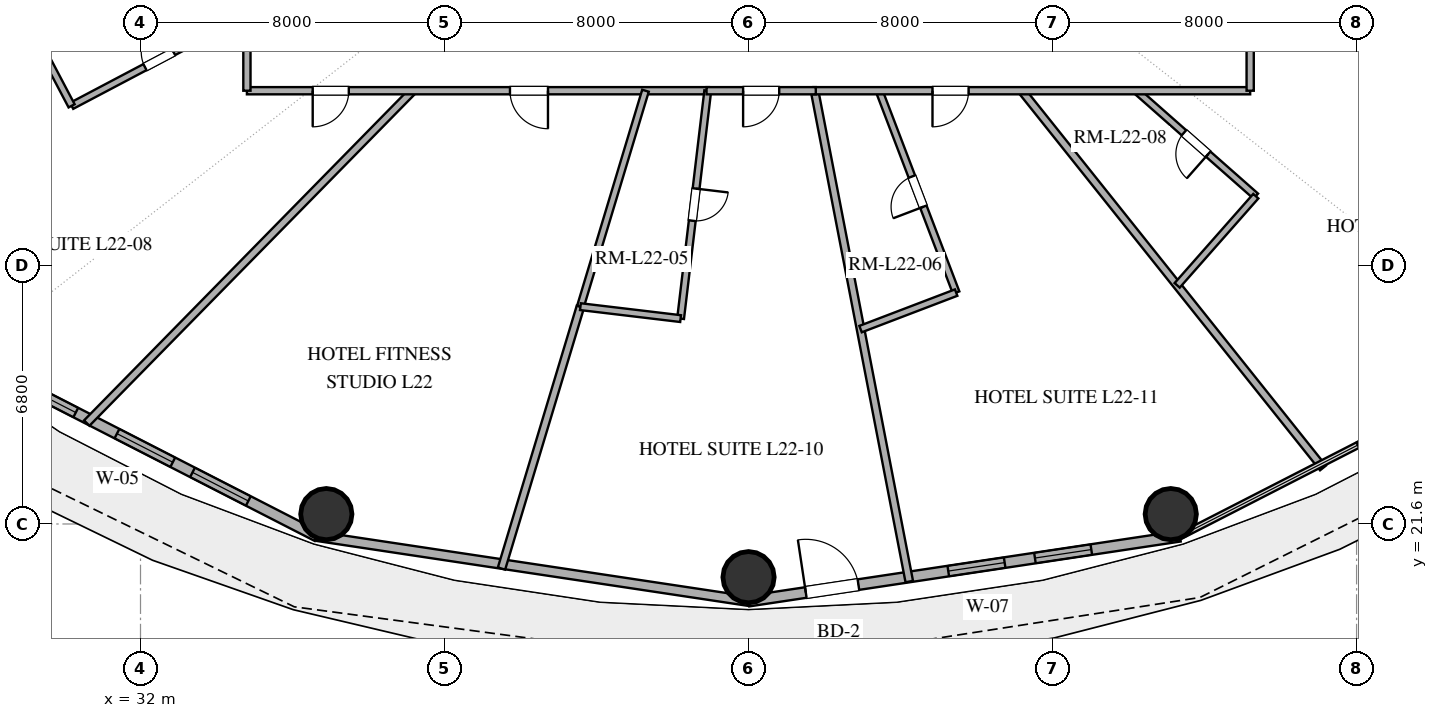
"""IFC4 building model, lengths in metres.
Left out: names, types, materials, properties, quantities, classifications, styles, units other than length and angle.
Written with IfcOpenShell. Run it as: python <this file> out.ifc"""

import sys

from ifc_helpers import new_model, si_unit, direction, frame, frame_2d, origin, origin_2d, place, context, subcontext, project, spatial, rectangle, hollow_circle, extrude, element, fill, save


model = new_model("IFC4")
c1 = context("Model", 3, precision=1e-05, world=origin(), true_north=direction((0.0, 1.0)))
c2 = subcontext(c1, "Body", "Model", "MODEL_VIEW")
j1 = project(units=[si_unit("LENGTHUNIT", "METRE"), si_unit("PLANEANGLEUNIT", "RADIAN")], contexts=[c1])
p1 = place(None, origin())
s1 = spatial("IfcSite", under=j1, at=p1, CompositionType="ELEMENT")
p2 = place(p1, origin())
s2 = spatial("IfcBuilding", under=s1, at=p2, CompositionType="ELEMENT")
p3 = place(p2, frame((0.0, 0.0, 91.2)))
s3 = spatial("IfcBuildingStorey", under=s2, at=p3, CompositionType="ELEMENT", Elevation=91.2)
for number, where, z_axis, x_axis in (
    (1, (36.89, 21.859, 0.0), (0.0, 0.0, 1.0), (1.0, 0.0, 0.0)),
    (2, (48.0, 20.2, 0.0), (0.0, 0.0, 1.0), (1.0, 0.0, 0.0)),
    (3, (59.11, 21.859, 0.0), (0.0, 0.0, 1.0), (1.0, 0.0, 0.0)),
):
    element("IfcColumn", number, at=place(p3, frame(where, z_axis=z_axis, x_axis=x_axis)), inside=s3, PredefinedType="COLUMN", context=c2, shape_type="SweptSolid", body=[
        extrude(hollow_circle(Radius=0.675, WallThickness=0.036, at=origin_2d()), origin(), (0.0, 0.0, 1.0), 3.38),
    ])
p4 = place(p3, frame((27.16, 26.14, 0.0), z_axis=(0.0, 0.0, 1.0), x_axis=(0.889959505023, -0.45603955905, 0.0)))
e4 = element("IfcWall", 4, at=p4, inside=s3, PredefinedType="SOLIDWALL", context=c2, shape_type="SweptSolid", body=[
    extrude(rectangle(XDim=10.662, YDim=0.28, at=frame_2d((5.331, 0.0))), origin(), (0.0, 0.0, 1.0), 3.38),
])
p5 = place(p4, frame((1.724, 0.0, 0.85)))
e5 = element("IfcOpeningElement", 5, at=p5, cuts=e4, PredefinedType="OPENING", context=c2, shape_type="SweptSolid", body=[
    extrude(rectangle(XDim=1.8, YDim=2.2, at=frame_2d((0.9, 1.1))), frame((0.0, 0.15, 0.0), z_axis=(0.0, -1.0, 0.0), x_axis=(1.0, 0.0, 0.0)), (0.0, 0.0, 1.0), 0.3),
])
p6 = place(p4, frame((4.742, 0.0, 0.85)))
e6 = element("IfcOpeningElement", 6, at=p6, cuts=e4, PredefinedType="OPENING", context=c2, shape_type="SweptSolid", body=[
    extrude(rectangle(XDim=1.65, YDim=2.0, at=frame_2d((0.825, 1.0))), frame((0.0, 0.15, 0.0), z_axis=(0.0, -1.0, 0.0), x_axis=(1.0, 0.0, 0.0)), (0.0, 0.0, 1.0), 0.3),
])
p7 = place(p4, frame((6.977, 0.0, 0.85)))
e7 = element("IfcOpeningElement", 7, at=p7, cuts=e4, PredefinedType="OPENING", context=c2, shape_type="SweptSolid", body=[
    extrude(rectangle(XDim=1.65, YDim=2.0, at=frame_2d((0.825, 1.0))), frame((0.0, 0.15, 0.0), z_axis=(0.0, -1.0, 0.0), x_axis=(1.0, 0.0, 0.0)), (0.0, 0.0, 1.0), 0.3),
])
p8 = place(p3, frame((36.649, 21.277, 0.0), z_axis=(0.0, 0.0, 1.0), x_axis=(0.988877774656, -0.148730450117, 0.0)))
e8 = element("IfcWall", 8, at=p8, inside=s3, PredefinedType="SOLIDWALL", context=c2, shape_type="SweptSolid", body=[
    extrude(rectangle(XDim=11.479, YDim=0.25, at=frame_2d((5.74, 0.0))), origin(), (0.0, 0.0, 1.0), 3.38),
])
p9 = place(p3, frame((48.0, 19.57, 0.0), z_axis=(0.0, 0.0, 1.0), x_axis=(0.988877774656, 0.148730450117, 0.0)))
e9 = element("IfcWall", 9, at=p9, inside=s3, PredefinedType="SOLIDWALL", context=c2, shape_type="SweptSolid", body=[
    extrude(rectangle(XDim=11.479, YDim=0.28, at=frame_2d((5.74, 0.0))), origin(), (0.0, 0.0, 1.0), 3.38),
])
p10 = place(p9, frame((1.524, 0.0, 0.0)))
e10 = element("IfcOpeningElement", 10, at=p10, cuts=e9, PredefinedType="OPENING", context=c2, shape_type="SweptSolid", body=[
    extrude(rectangle(XDim=1.4, YDim=2.2, at=frame_2d((0.7, 1.1))), frame((0.0, 0.15, 0.0), z_axis=(0.0, -1.0, 0.0), x_axis=(1.0, 0.0, 0.0)), (0.0, 0.0, 1.0), 0.3),
])
p11 = place(p9, frame((5.315, 0.0, 0.85)))
e11 = element("IfcOpeningElement", 11, at=p11, cuts=e9, PredefinedType="OPENING", context=c2, shape_type="SweptSolid", body=[
    extrude(rectangle(XDim=1.5, YDim=1.8, at=frame_2d((0.75, 0.9))), frame((0.0, 0.15, 0.0), z_axis=(0.0, -1.0, 0.0), x_axis=(1.0, 0.0, 0.0)), (0.0, 0.0, 1.0), 0.3),
])
p12 = place(p9, frame((7.621, 0.0, 0.85)))
e12 = element("IfcOpeningElement", 12, at=p12, cuts=e9, PredefinedType="OPENING", context=c2, shape_type="SweptSolid", body=[
    extrude(rectangle(XDim=1.5, YDim=1.8, at=frame_2d((0.75, 0.9))), frame((0.0, 0.15, 0.0), z_axis=(0.0, -1.0, 0.0), x_axis=(1.0, 0.0, 0.0)), (0.0, 0.0, 1.0), 0.3),
])
p13 = place(p3, frame((39.167, 33.0, 0.0), z_axis=(0.0, 0.0, 1.0), x_axis=(-0.700440086719, -0.713711205542, 0.0)))
e13 = element("IfcWall", 13, at=p13, inside=s3, PredefinedType="PARTITIONING", context=c2, shape_type="SweptSolid", body=[
    extrude(rectangle(XDim=12.252, YDim=0.2, at=frame_2d((6.126, 0.0))), origin(), (0.0, 0.0, 1.0), 2.74),
])
p14 = place(p3, frame((34.8, 37.75, 0.0), z_axis=(0.0, 0.0, 1.0), x_axis=(-0.951880556228, -0.306469258939, 0.0)))
e14 = element("IfcWall", 14, at=p14, inside=s3, PredefinedType="PARTITIONING", context=c2, shape_type="SweptSolid", body=[
    extrude(rectangle(XDim=14.428, YDim=0.2, at=frame_2d((7.214, 0.0))), origin(), (0.0, 0.0, 1.0), 2.74),
])
p15 = place(p3, frame((41.5, 20.427, 0.0), z_axis=(0.0, 0.0, 1.0), x_axis=(0.288514746458, 0.957475451944, 0.0)))
e15 = element("IfcWall", 15, at=p15, inside=s3, PredefinedType="PARTITIONING", context=c2, shape_type="SweptSolid", body=[
    extrude(rectangle(XDim=7.197, YDim=0.2, at=frame_2d((3.599, 0.0))), origin(), (0.0, 0.0, 1.0), 2.74),
])
p16 = place(p3, frame((49.737, 33.0, 0.0), z_axis=(0.0, 0.0, 1.0), x_axis=(0.18949034594, -0.981882584017, 0.0)))
e16 = element("IfcWall", 16, at=p16, inside=s3, PredefinedType="PARTITIONING", context=c2, shape_type="SweptSolid", body=[
    extrude(rectangle(XDim=13.153, YDim=0.2, at=frame_2d((6.577, 0.0))), origin(), (0.0, 0.0, 1.0), 2.74),
])
p17 = place(p3, frame((61.2, 36.208, 0.0), z_axis=(0.0, 0.0, 1.0), x_axis=(0.915722078144, -0.401812239235, 0.0)))
e17 = element("IfcWall", 17, at=p17, inside=s3, PredefinedType="PARTITIONING", context=c2, shape_type="SweptSolid", body=[
    extrude(rectangle(XDim=12.915, YDim=0.2, at=frame_2d((6.458, 0.0))), origin(), (0.0, 0.0, 1.0), 2.74),
])
p18 = place(p3, frame((55.189, 33.0, 0.0), z_axis=(0.0, 0.0, 1.0), x_axis=(0.624085468444, -0.781356082767, 0.0)))
e18 = element("IfcWall", 18, at=p18, inside=s3, PredefinedType="PARTITIONING", context=c2, shape_type="SweptSolid", body=[
    extrude(rectangle(XDim=12.703, YDim=0.2, at=frame_2d((6.352, 0.0))), origin(), (0.0, 0.0, 1.0), 2.74),
])
p19 = place(p3, frame((46.959, 33.0, 0.0), z_axis=(0.0, 0.0, 1.0), x_axis=(-1.0, 0.0, 0.0)))
e19 = element("IfcWall", 19, at=p19, inside=s3, PredefinedType="PARTITIONING", context=c2, shape_type="SweptSolid", body=[
    extrude(rectangle(XDim=12.159, YDim=0.19, at=frame_2d((6.08, 0.0))), origin(), (0.0, 0.0, 1.0), 2.74),
])
p20 = place(p19, frame((4.237, 0.0, 0.0)))
e20 = element("IfcOpeningElement", 20, at=p20, cuts=e19, PredefinedType="OPENING", context=c2, shape_type="SweptSolid", body=[
    extrude(rectangle(XDim=1.0, YDim=2.2, at=frame_2d((0.5, 1.1))), frame((0.0, 0.105, 0.0), z_axis=(0.0, -1.0, 0.0), x_axis=(1.0, 0.0, 0.0)), (0.0, 0.0, 1.0), 0.21),
])
p21 = place(p19, frame((9.478, 0.0, 0.0)))
e21 = element("IfcOpeningElement", 21, at=p21, cuts=e19, PredefinedType="OPENING", context=c2, shape_type="SweptSolid", body=[
    extrude(rectangle(XDim=0.95, YDim=2.15, at=frame_2d((0.475, 1.075))), frame((0.0, 0.105, 0.0), z_axis=(0.0, -1.0, 0.0), x_axis=(1.0, 0.0, 0.0)), (0.0, 0.0, 1.0), 0.21),
])
p22 = place(p3, frame((46.927, 33.0, 0.0), z_axis=(0.0, 0.0, 1.0), x_axis=(-0.118379942802, -0.99296837268, 0.0)))
e22 = element("IfcWall", 22, at=p22, inside=s3, PredefinedType="PLUMBINGWALL", context=c2, shape_type="SweptSolid", body=[
    extrude(rectangle(XDim=6.039, YDim=0.18, at=frame_2d((3.019, 0.0))), origin(), (0.0, 0.0, 1.0), 2.74),
])
p23 = place(p22, frame((2.594, 0.0, 0.0)))
e23 = element("IfcOpeningElement", 23, at=p23, cuts=e22, PredefinedType="OPENING", context=c2, shape_type="SweptSolid", body=[
    extrude(rectangle(XDim=0.85, YDim=2.1, at=frame_2d((0.425, 1.05))), frame((0.0, 0.1, 0.0), z_axis=(0.0, -1.0, 0.0), x_axis=(1.0, 0.0, 0.0)), (0.0, 0.0, 1.0), 0.2),
])
p24 = place(p3, frame((43.576, 27.318, 0.0), z_axis=(0.0, 0.0, 1.0), x_axis=(0.288532873685, 0.957469989505, 0.0)))
e24 = element("IfcWall", 24, at=p24, inside=s3, PredefinedType="PLUMBINGWALL", context=c2, shape_type="SweptSolid", body=[
    extrude(rectangle(XDim=5.934, YDim=0.18, at=frame_2d((2.967, 0.0))), origin(), (0.0, 0.0, 1.0), 2.74),
])
p25 = place(p3, frame((53.463, 27.688, 0.0), z_axis=(0.0, 0.0, 1.0), x_axis=(-0.356604128264, 0.934255583716, 0.0)))
e25 = element("IfcWall", 25, at=p25, inside=s3, PredefinedType="PLUMBINGWALL", context=c2, shape_type="SweptSolid", body=[
    extrude(rectangle(XDim=5.686, YDim=0.18, at=frame_2d((2.843, 0.0))), origin(), (0.0, 0.0, 1.0), 2.74),
])
p26 = place(p25, frame((2.418, 0.0, 0.0)))
e26 = element("IfcOpeningElement", 26, at=p26, cuts=e25, PredefinedType="OPENING", context=c2, shape_type="SweptSolid", body=[
    extrude(rectangle(XDim=0.85, YDim=2.1, at=frame_2d((0.425, 1.05))), frame((0.0, 0.1, 0.0), z_axis=(0.0, -1.0, 0.0), x_axis=(1.0, 0.0, 0.0)), (0.0, 0.0, 1.0), 0.2),
])
p27 = place(p3, frame((30.187, 32.602, 0.0), z_axis=(0.0, 0.0, 1.0), x_axis=(0.884469007168, 0.466598944877, 0.0)))
e27 = element("IfcWall", 27, at=p27, inside=s3, PredefinedType="PLUMBINGWALL", context=c2, shape_type="SweptSolid", body=[
    extrude(rectangle(XDim=5.216, YDim=0.18, at=frame_2d((2.608, 0.0))), origin(), (0.0, 0.0, 1.0), 2.74),
])
p28 = place(p27, frame((2.183, 0.0, 0.0)))
e28 = element("IfcOpeningElement", 28, at=p28, cuts=e27, PredefinedType="OPENING", context=c2, shape_type="SweptSolid", body=[
    extrude(rectangle(XDim=0.85, YDim=2.1, at=frame_2d((0.425, 1.05))), frame((0.0, 0.1, 0.0), z_axis=(0.0, -1.0, 0.0), x_axis=(1.0, 0.0, 0.0)), (0.0, 0.0, 1.0), 0.2),
])
p29 = place(p3, frame((34.8, 33.0, 0.0), z_axis=(0.0, 0.0, 1.0), x_axis=(0.0, 1.0, 0.0)))
e29 = element("IfcWall", 29, at=p29, inside=s3, PredefinedType="PARTITIONING", context=c2, shape_type="SweptSolid", body=[
    extrude(rectangle(XDim=9.004, YDim=0.19, at=frame_2d((4.502, 0.0))), origin(), (0.0, 0.0, 1.0), 2.74),
])
p30 = place(p29, frame((6.385, 0.0, 0.0)))
e30 = element("IfcOpeningElement", 30, at=p30, cuts=e29, PredefinedType="OPENING", context=c2, shape_type="SweptSolid", body=[
    extrude(rectangle(XDim=0.95, YDim=2.15, at=frame_2d((0.475, 1.075))), frame((0.0, 0.105, 0.0), z_axis=(0.0, -1.0, 0.0), x_axis=(1.0, 0.0, 0.0)), (0.0, 0.0, 1.0), 0.21),
])
p31 = place(p3, frame((61.348, 30.225, 0.0), z_axis=(0.0, 0.0, 1.0), x_axis=(-0.749931272561, 0.661515749197, 0.0)))
e31 = element("IfcWall", 31, at=p31, inside=s3, PredefinedType="PLUMBINGWALL", context=c2, shape_type="SweptSolid", body=[
    extrude(rectangle(XDim=4.194, YDim=0.18, at=frame_2d((2.097, 0.0))), origin(), (0.0, 0.0, 1.0), 2.74),
])
p32 = place(p31, frame((1.672, 0.0, 0.0)))
e32 = element("IfcOpeningElement", 32, at=p32, cuts=e31, PredefinedType="OPENING", context=c2, shape_type="SweptSolid", body=[
    extrude(rectangle(XDim=0.85, YDim=2.1, at=frame_2d((0.425, 1.05))), frame((0.0, 0.1, 0.0), z_axis=(0.0, -1.0, 0.0), x_axis=(1.0, 0.0, 0.0)), (0.0, 0.0, 1.0), 0.2),
])
p33 = place(p3, frame((61.2, 33.0, 0.0), z_axis=(0.0, 0.0, 1.0), x_axis=(-1.0, 0.0, 0.0)))
e33 = element("IfcWall", 33, at=p33, inside=s3, PredefinedType="PARTITIONING", context=c2, shape_type="SweptSolid", body=[
    extrude(rectangle(XDim=11.496, YDim=0.19, at=frame_2d((5.748, 0.0))), origin(), (0.0, 0.0, 1.0), 2.74),
])
p34 = place(p33, frame((7.41, 0.0, 0.0)))
e34 = element("IfcOpeningElement", 34, at=p34, cuts=e33, PredefinedType="OPENING", context=c2, shape_type="SweptSolid", body=[
    extrude(rectangle(XDim=0.95, YDim=2.15, at=frame_2d((0.475, 1.075))), frame((0.0, 0.105, 0.0), z_axis=(0.0, -1.0, 0.0), x_axis=(1.0, 0.0, 0.0)), (0.0, 0.0, 1.0), 0.21),
])
p35 = place(p3, frame((28.535, 35.733, 0.0), z_axis=(0.0, 0.0, 1.0), x_axis=(0.466638742987, -0.884448010651, 0.0)))
e35 = element("IfcWall", 35, at=p35, inside=s3, PredefinedType="PLUMBINGWALL", context=c2, shape_type="SweptSolid", body=[
    extrude(rectangle(XDim=3.54, YDim=0.18, at=frame_2d((1.77, 0.0))), origin(), (0.0, 0.0, 1.0), 2.74),
])
p36 = place(p3, frame((61.2, 36.243, 0.0), z_axis=(0.0, 0.0, 1.0), x_axis=(0.0, -1.0, 0.0)))
e36 = element("IfcWall", 36, at=p36, inside=s3, PredefinedType="PARTITIONING", context=c2, shape_type="SweptSolid", body=[
    extrude(rectangle(XDim=3.243, YDim=0.19, at=frame_2d((1.621, 0.0))), origin(), (0.0, 0.0, 1.0), 2.74),
])
p37 = place(p36, frame((1.146, 0.0, 0.0)))
e37 = element("IfcOpeningElement", 37, at=p37, cuts=e36, PredefinedType="OPENING", context=c2, shape_type="SweptSolid", body=[
    extrude(rectangle(XDim=0.95, YDim=2.15, at=frame_2d((0.475, 1.075))), frame((0.0, 0.105, 0.0), z_axis=(0.0, -1.0, 0.0), x_axis=(1.0, 0.0, 0.0)), (0.0, 0.0, 1.0), 0.21),
])
p38 = place(p3, frame((59.279, 27.879, 0.0), z_axis=(0.0, 0.0, 1.0), x_axis=(0.661515810511, 0.749931218475, 0.0)))
e38 = element("IfcWall", 38, at=p38, inside=s3, PredefinedType="PLUMBINGWALL", context=c2, shape_type="SweptSolid", body=[
    extrude(rectangle(XDim=3.129, YDim=0.18, at=frame_2d((1.564, 0.0))), origin(), (0.0, 0.0, 1.0), 2.74),
])
p39 = place(p3, frame((49.77, 33.0, 0.0), z_axis=(0.0, 0.0, 1.0), x_axis=(-1.0, 0.0, 0.0)))
e39 = element("IfcWall", 39, at=p39, inside=s3, PredefinedType="PARTITIONING", context=c2, shape_type="SweptSolid", body=[
    extrude(rectangle(XDim=2.875, YDim=0.19, at=frame_2d((1.438, 0.0))), origin(), (0.0, 0.0, 1.0), 2.74),
])
p40 = place(p39, frame((0.962, 0.0, 0.0)))
e40 = element("IfcOpeningElement", 40, at=p40, cuts=e39, PredefinedType="OPENING", context=c2, shape_type="SweptSolid", body=[
    extrude(rectangle(XDim=0.95, YDim=2.15, at=frame_2d((0.475, 1.075))), frame((0.0, 0.105, 0.0), z_axis=(0.0, -1.0, 0.0), x_axis=(1.0, 0.0, 0.0)), (0.0, 0.0, 1.0), 0.21),
])
p41 = place(p3, frame((50.948, 26.728, 0.0), z_axis=(0.0, 0.0, 1.0), x_axis=(0.934244754769, 0.35663249738, 0.0)))
e41 = element("IfcWall", 41, at=p41, inside=s3, PredefinedType="PLUMBINGWALL", context=c2, shape_type="SweptSolid", body=[
    extrude(rectangle(XDim=2.692, YDim=0.18, at=frame_2d((1.346, 0.0))), origin(), (0.0, 0.0, 1.0), 2.74),
])
p42 = place(p3, frame((46.212, 27.004, 0.0), z_axis=(0.0, 0.0, 1.0), x_axis=(-0.992959714657, 0.118452543529, 0.0)))
e42 = element("IfcWall", 42, at=p42, inside=s3, PredefinedType="PLUMBINGWALL", context=c2, shape_type="SweptSolid", body=[
    extrude(rectangle(XDim=2.655, YDim=0.18, at=frame_2d((1.327, 0.0))), origin(), (0.0, 0.0, 1.0), 2.74),
])
p43 = place(p5, origin())
e43 = element("IfcWindow", 43, at=p43, inside=s3, PartitioningType="SINGLE_PANEL", PredefinedType="WINDOW", context=c2, shape_type="SweptSolid", body=[
    extrude(rectangle(XDim=1.8, YDim=2.2, at=frame_2d((0.9, 1.1))), frame((0.0, 0.03, 0.0), z_axis=(0.0, -1.0, 0.0), x_axis=(1.0, 0.0, 0.0)), (0.0, 0.0, 1.0), 0.06),
])
fill(e5, e43)
p44 = place(p6, origin())
e44 = element("IfcWindow", 44, at=p44, inside=s3, PartitioningType="SINGLE_PANEL", PredefinedType="WINDOW", context=c2, shape_type="SweptSolid", body=[
    extrude(rectangle(XDim=1.65, YDim=2.0, at=frame_2d((0.825, 1.0))), frame((0.0, 0.03, 0.0), z_axis=(0.0, -1.0, 0.0), x_axis=(1.0, 0.0, 0.0)), (0.0, 0.0, 1.0), 0.06),
])
fill(e6, e44)
p45 = place(p7, origin())
e45 = element("IfcWindow", 45, at=p45, inside=s3, PartitioningType="SINGLE_PANEL", PredefinedType="WINDOW", context=c2, shape_type="SweptSolid", body=[
    extrude(rectangle(XDim=1.65, YDim=2.0, at=frame_2d((0.825, 1.0))), frame((0.0, 0.03, 0.0), z_axis=(0.0, -1.0, 0.0), x_axis=(1.0, 0.0, 0.0)), (0.0, 0.0, 1.0), 0.06),
])
fill(e7, e45)
p46 = place(p10, origin())
e46 = element("IfcDoor", 46, at=p46, inside=s3, OperationType="SINGLE_SWING_LEFT", PredefinedType="DOOR", context=c2, shape_type="SweptSolid", body=[
    extrude(rectangle(XDim=1.4, YDim=2.2, at=frame_2d((0.7, 1.1))), frame((0.0, 0.025, 0.0), z_axis=(0.0, -1.0, 0.0), x_axis=(1.0, 0.0, 0.0)), (0.0, 0.0, 1.0), 0.05),
])
fill(e10, e46)
p47 = place(p11, origin())
e47 = element("IfcWindow", 47, at=p47, inside=s3, PartitioningType="SINGLE_PANEL", PredefinedType="WINDOW", context=c2, shape_type="SweptSolid", body=[
    extrude(rectangle(XDim=1.5, YDim=1.8, at=frame_2d((0.75, 0.9))), frame((0.0, 0.03, 0.0), z_axis=(0.0, -1.0, 0.0), x_axis=(1.0, 0.0, 0.0)), (0.0, 0.0, 1.0), 0.06),
])
fill(e11, e47)
p48 = place(p12, origin())
e48 = element("IfcWindow", 48, at=p48, inside=s3, PartitioningType="SINGLE_PANEL", PredefinedType="WINDOW", context=c2, shape_type="SweptSolid", body=[
    extrude(rectangle(XDim=1.5, YDim=1.8, at=frame_2d((0.75, 0.9))), frame((0.0, 0.03, 0.0), z_axis=(0.0, -1.0, 0.0), x_axis=(1.0, 0.0, 0.0)), (0.0, 0.0, 1.0), 0.06),
])
fill(e12, e48)
p49 = place(p20, origin())
e49 = element("IfcDoor", 49, at=p49, inside=s3, OperationType="SINGLE_SWING_LEFT", PredefinedType="DOOR", context=c2, shape_type="SweptSolid", body=[
    extrude(rectangle(XDim=1.0, YDim=2.2, at=frame_2d((0.5, 1.1))), frame((0.0, 0.025, 0.0), z_axis=(0.0, -1.0, 0.0), x_axis=(1.0, 0.0, 0.0)), (0.0, 0.0, 1.0), 0.05),
])
fill(e20, e49)
p50 = place(p21, origin())
e50 = element("IfcDoor", 50, at=p50, inside=s3, OperationType="SINGLE_SWING_RIGHT", PredefinedType="DOOR", context=c2, shape_type="SweptSolid", body=[
    extrude(rectangle(XDim=0.95, YDim=2.15, at=frame_2d((0.475, 1.075))), frame((0.0, 0.025, 0.0), z_axis=(0.0, -1.0, 0.0), x_axis=(1.0, 0.0, 0.0)), (0.0, 0.0, 1.0), 0.05),
])
fill(e21, e50)
p51 = place(p23, origin())
e51 = element("IfcDoor", 51, at=p51, inside=s3, OperationType="SINGLE_SWING_LEFT", PredefinedType="DOOR", context=c2, shape_type="SweptSolid", body=[
    extrude(rectangle(XDim=0.85, YDim=2.1, at=frame_2d((0.425, 1.05))), frame((0.0, 0.025, 0.0), z_axis=(0.0, -1.0, 0.0), x_axis=(1.0, 0.0, 0.0)), (0.0, 0.0, 1.0), 0.05),
])
fill(e23, e51)
p52 = place(p26, origin())
e52 = element("IfcDoor", 52, at=p52, inside=s3, OperationType="SINGLE_SWING_LEFT", PredefinedType="DOOR", context=c2, shape_type="SweptSolid", body=[
    extrude(rectangle(XDim=0.85, YDim=2.1, at=frame_2d((0.425, 1.05))), frame((0.0, 0.025, 0.0), z_axis=(0.0, -1.0, 0.0), x_axis=(1.0, 0.0, 0.0)), (0.0, 0.0, 1.0), 0.05),
])
fill(e26, e52)
p53 = place(p28, origin())
e53 = element("IfcDoor", 53, at=p53, inside=s3, OperationType="SINGLE_SWING_RIGHT", PredefinedType="DOOR", context=c2, shape_type="SweptSolid", body=[
    extrude(rectangle(XDim=0.85, YDim=2.1, at=frame_2d((0.425, 1.05))), frame((0.0, 0.025, 0.0), z_axis=(0.0, -1.0, 0.0), x_axis=(1.0, 0.0, 0.0)), (0.0, 0.0, 1.0), 0.05),
])
fill(e28, e53)
p54 = place(p32, origin())
e54 = element("IfcDoor", 54, at=p54, inside=s3, OperationType="SINGLE_SWING_LEFT", PredefinedType="DOOR", context=c2, shape_type="SweptSolid", body=[
    extrude(rectangle(XDim=0.85, YDim=2.1, at=frame_2d((0.425, 1.05))), frame((0.0, 0.025, 0.0), z_axis=(0.0, -1.0, 0.0), x_axis=(1.0, 0.0, 0.0)), (0.0, 0.0, 1.0), 0.05),
])
fill(e32, e54)
p55 = place(p34, origin())
e55 = element("IfcDoor", 55, at=p55, inside=s3, OperationType="SINGLE_SWING_RIGHT", PredefinedType="DOOR", context=c2, shape_type="SweptSolid", body=[
    extrude(rectangle(XDim=0.95, YDim=2.15, at=frame_2d((0.475, 1.075))), frame((0.0, 0.025, 0.0), z_axis=(0.0, -1.0, 0.0), x_axis=(1.0, 0.0, 0.0)), (0.0, 0.0, 1.0), 0.05),
])
fill(e34, e55)
p56 = place(p40, origin())
e56 = element("IfcDoor", 56, at=p56, inside=s3, OperationType="SINGLE_SWING_RIGHT", PredefinedType="DOOR", context=c2, shape_type="SweptSolid", body=[
    extrude(rectangle(XDim=0.95, YDim=2.15, at=frame_2d((0.475, 1.075))), frame((0.0, 0.025, 0.0), z_axis=(0.0, -1.0, 0.0), x_axis=(1.0, 0.0, 0.0)), (0.0, 0.0, 1.0), 0.05),
])
fill(e40, e56)
save(model, sys.argv[1])
